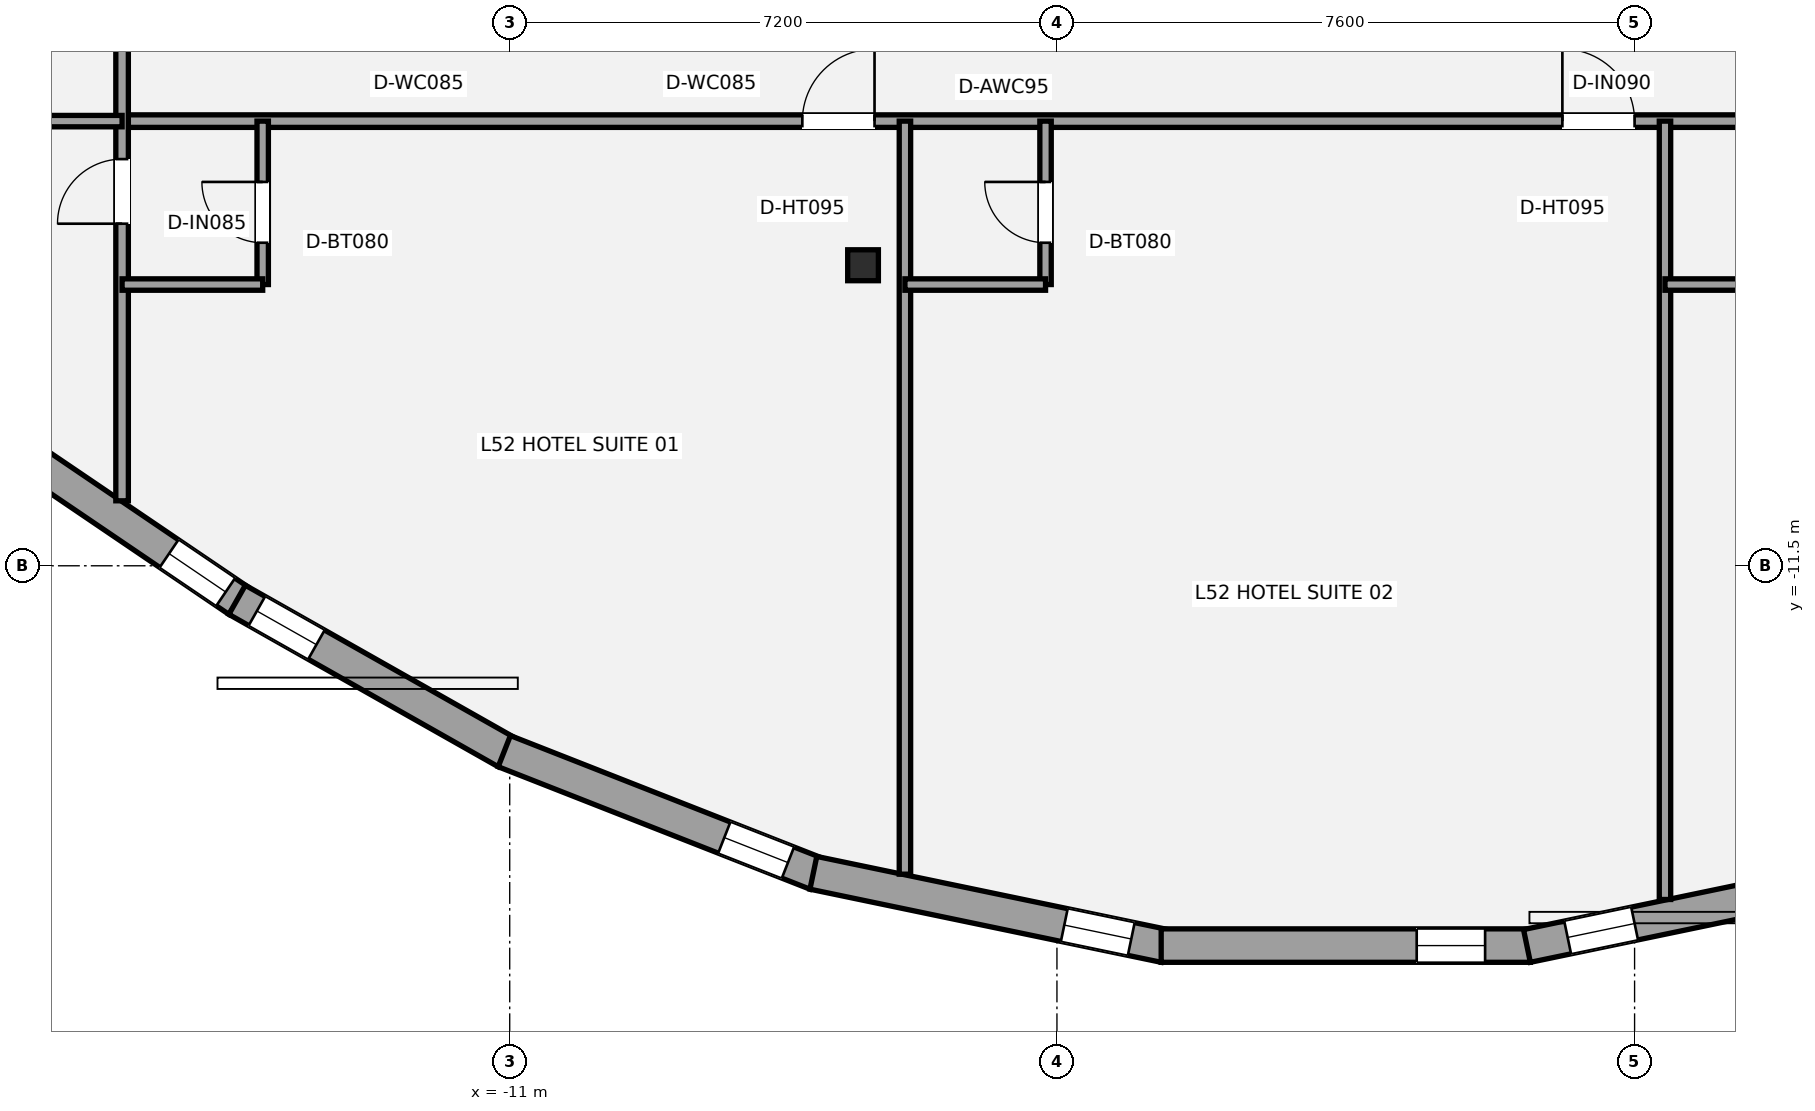
"""IFC4 building model, lengths in metres.
Left out: names, types, materials, properties, quantities, classifications, styles, units other than length and angle.
Written with IfcOpenShell. Run it as: python <this file> out.ifc"""

import sys

from ifc_helpers import new_model, si_unit, direction, frame, frame_2d, origin, origin_2d, place, context, subcontext, project, spatial, rectangle, i_section, extrude, element, fill, save


model = new_model("IFC4")
c1 = context("Model", 3, precision=1e-05, world=origin(), true_north=direction((0.0, 1.0)))
c2 = subcontext(c1, "Body", "Model", "MODEL_VIEW")
j1 = project(units=[si_unit("LENGTHUNIT", "METRE"), si_unit("PLANEANGLEUNIT", "RADIAN")], contexts=[c1])
p1 = place(None, origin())
s1 = spatial("IfcSite", under=j1, at=p1, CompositionType="ELEMENT")
p2 = place(p1, origin())
s2 = spatial("IfcBuilding", under=s1, at=p2, CompositionType="ELEMENT")
p3 = place(p2, frame((0.0, 0.0, 188.6)))
s3 = spatial("IfcBuildingStorey", under=s2, at=p3, CompositionType="ELEMENT", Elevation=188.6)
p4 = place(p3, frame((-6.351, -7.546, 0.0), z_axis=(0.0, 0.0, 1.0), x_axis=(1.0, 0.0, 0.0)))
e1 = element("IfcColumn", 1, at=p4, inside=s3, PredefinedType="COLUMN", context=c2, shape_type="SweptSolid", body=[
    extrude(i_section(OverallWidth=0.404, OverallDepth=0.407, WebThickness=0.027, FlangeThickness=0.044, at=origin_2d()), origin(), (0.0, 0.0, 1.0), 3.2),
])
p5 = place(p3, frame((-14.571, -11.957, 0.0), z_axis=(0.0, 0.0, 1.0), x_axis=(-0.82772633423, 0.56113199483, 0.0)))
e2 = element("IfcWall", 2, at=p5, inside=s3, PredefinedType="STANDARD", context=c2, shape_type="SweptSolid", body=[
    extrude(rectangle(XDim=3.879, YDim=0.44, at=frame_2d((1.939, 0.0))), origin(), (0.0, 0.0, 1.0), 2.315),
])
p6 = place(p5, frame((0.2, 0.0, 0.58)))
e3 = element("IfcOpeningElement", 3, at=p6, cuts=e2, PredefinedType="OPENING", context=c2, shape_type="SweptSolid", body=[
    extrude(rectangle(XDim=0.9, YDim=1.35, at=frame_2d((0.45, 0.675))), frame((0.0, 0.23, 0.0), z_axis=(0.0, -1.0, 0.0), x_axis=(1.0, 0.0, 0.0)), (0.0, 0.0, 1.0), 0.46),
])
p7 = place(p3, frame((-11.043, -13.952, 0.0), z_axis=(0.0, 0.0, 1.0), x_axis=(-0.870346086449, 0.492440544434, 0.0)))
e4 = element("IfcWall", 4, at=p7, inside=s3, PredefinedType="STANDARD", context=c2, shape_type="SweptSolid", body=[
    extrude(rectangle(XDim=4.071, YDim=0.44, at=frame_2d((2.036, 0.0))), origin(), (0.0, 0.0, 1.0), 2.315),
])
p8 = place(p7, frame((2.872, 0.0, 0.58)))
e5 = element("IfcOpeningElement", 5, at=p8, cuts=e4, PredefinedType="OPENING", context=c2, shape_type="SweptSolid", body=[
    extrude(rectangle(XDim=0.9, YDim=1.35, at=frame_2d((0.45, 0.675))), frame((0.0, 0.23, 0.0), z_axis=(0.0, -1.0, 0.0), x_axis=(1.0, 0.0, 0.0)), (0.0, 0.0, 1.0), 0.46),
])
p9 = place(p3, frame((-6.969, -15.55, 0.0), z_axis=(0.0, 0.0, 1.0), x_axis=(-0.930777752543, 0.365585524018, 0.0)))
e6 = element("IfcWall", 6, at=p9, inside=s3, PredefinedType="STANDARD", context=c2, shape_type="SweptSolid", body=[
    extrude(rectangle(XDim=4.407, YDim=0.44, at=frame_2d((2.203, 0.0))), origin(), (0.0, 0.0, 1.0), 2.315),
])
p10 = place(p9, frame((0.397, 0.0, 0.58)))
e7 = element("IfcOpeningElement", 7, at=p10, cuts=e6, PredefinedType="OPENING", context=c2, shape_type="SweptSolid", body=[
    extrude(rectangle(XDim=0.9, YDim=1.35, at=frame_2d((0.45, 0.675))), frame((0.0, 0.23, 0.0), z_axis=(0.0, -1.0, 0.0), x_axis=(1.0, 0.0, 0.0)), (0.0, 0.0, 1.0), 0.46),
])
p11 = place(p3, frame((-2.384, -16.501, 0.0), z_axis=(0.0, 0.0, 1.0), x_axis=(-0.979004509935, 0.203838586943, 0.0)))
e8 = element("IfcWall", 8, at=p11, inside=s3, PredefinedType="STANDARD", context=c2, shape_type="SweptSolid", body=[
    extrude(rectangle(XDim=4.72, YDim=0.44, at=frame_2d((2.36, 0.0))), origin(), (0.0, 0.0, 1.0), 2.315),
])
p12 = place(p11, frame((0.448, 0.0, 0.58)))
e9 = element("IfcOpeningElement", 9, at=p12, cuts=e8, PredefinedType="OPENING", context=c2, shape_type="SweptSolid", body=[
    extrude(rectangle(XDim=0.9, YDim=1.35, at=frame_2d((0.45, 0.675))), frame((0.0, 0.23, 0.0), z_axis=(0.0, -1.0, 0.0), x_axis=(1.0, 0.0, 0.0)), (0.0, 0.0, 1.0), 0.46),
])
p13 = place(p3, frame((2.429, -16.497, 0.0), z_axis=(0.0, 0.0, 1.0), x_axis=(-1.0, 0.0, 0.0)))
e10 = element("IfcWall", 10, at=p13, inside=s3, PredefinedType="STANDARD", context=c2, shape_type="SweptSolid", body=[
    extrude(rectangle(XDim=4.857, YDim=0.44, at=frame_2d((2.429, 0.0))), origin(), (0.0, 0.0, 1.0), 2.315),
])
p14 = place(p13, frame((0.595, 0.0, 0.58)))
e11 = element("IfcOpeningElement", 11, at=p14, cuts=e10, PredefinedType="OPENING", context=c2, shape_type="SweptSolid", body=[
    extrude(rectangle(XDim=0.9, YDim=1.35, at=frame_2d((0.45, 0.675))), frame((0.0, 0.23, 0.0), z_axis=(0.0, -1.0, 0.0), x_axis=(1.0, 0.0, 0.0)), (0.0, 0.0, 1.0), 0.46),
])
p15 = place(p3, frame((7.005, -15.539, 0.0), z_axis=(0.0, 0.0, 1.0), x_axis=(-0.979004509935, -0.203838586943, 0.0)))
e12 = element("IfcWall", 12, at=p15, inside=s3, PredefinedType="STANDARD", context=c2, shape_type="SweptSolid", body=[
    extrude(rectangle(XDim=4.72, YDim=0.44, at=frame_2d((2.36, 0.0))), origin(), (0.0, 0.0, 1.0), 2.315),
])
p16 = place(p15, frame((3.273, 0.0, 0.58)))
e13 = element("IfcOpeningElement", 13, at=p16, cuts=e12, PredefinedType="OPENING", context=c2, shape_type="SweptSolid", body=[
    extrude(rectangle(XDim=0.9, YDim=1.35, at=frame_2d((0.45, 0.675))), frame((0.0, 0.23, 0.0), z_axis=(0.0, -1.0, 0.0), x_axis=(1.0, 0.0, 0.0)), (0.0, 0.0, 1.0), 0.46),
])
p17 = place(p3, frame((-16.1, -5.65, 0.0), z_axis=(0.0, 0.0, 1.0), x_axis=(1.0, 0.0, 0.0)))
e14 = element("IfcWall", 14, at=p17, inside=s3, PredefinedType="PARTITIONING", context=c2, shape_type="SweptSolid", body=[
    extrude(rectangle(XDim=31.65, YDim=0.165, at=frame_2d((15.825, 0.0))), origin(), (0.0, 0.0, 1.0), 2.398),
])
p18 = place(p17, frame((8.95, 0.0, 0.0)))
e15 = element("IfcOpeningElement", 15, at=p18, cuts=e14, PredefinedType="OPENING", context=c2, shape_type="SweptSolid", body=[
    extrude(rectangle(XDim=0.95, YDim=2.15, at=frame_2d((0.475, 1.075))), frame((0.0, 0.093, 0.0), z_axis=(0.0, -1.0, 0.0), x_axis=(1.0, 0.0, 0.0)), (0.0, 0.0, 1.0), 0.185),
])
p19 = place(p17, frame((18.95, 0.0, 0.0)))
e16 = element("IfcOpeningElement", 16, at=p19, cuts=e14, PredefinedType="OPENING", context=c2, shape_type="SweptSolid", body=[
    extrude(rectangle(XDim=0.95, YDim=2.15, at=frame_2d((0.475, 1.075))), frame((0.0, 0.093, 0.0), z_axis=(0.0, -1.0, 0.0), x_axis=(1.0, 0.0, 0.0)), (0.0, 0.0, 1.0), 0.185),
])
p20 = place(p17, frame((30.3, 0.0, 0.0)))
e17 = element("IfcOpeningElement", 17, at=p20, cuts=e14, PredefinedType="OPENING", context=c2, shape_type="SweptSolid", body=[
    extrude(rectangle(XDim=0.95, YDim=2.15, at=frame_2d((0.475, 1.075))), frame((0.0, 0.093, 0.0), z_axis=(0.0, -1.0, 0.0), x_axis=(1.0, 0.0, 0.0)), (0.0, 0.0, 1.0), 0.185),
])
p21 = place(p3, frame((-16.1, -10.645, 0.0), z_axis=(0.0, 0.0, 1.0), x_axis=(0.0, 1.0, 0.0)))
e18 = element("IfcWall", 18, at=p21, inside=s3, PredefinedType="PARTITIONING", context=c2, shape_type="SweptSolid", body=[
    extrude(rectangle(XDim=18.195, YDim=0.165, at=frame_2d((9.098, 0.0))), origin(), (0.0, 0.0, 1.0), 2.473),
])
p22 = place(p21, frame((3.646, 0.0, 0.0)))
e19 = element("IfcOpeningElement", 19, at=p22, cuts=e18, PredefinedType="OPENING", context=c2, shape_type="SweptSolid", body=[
    extrude(rectangle(XDim=0.85, YDim=2.1, at=frame_2d((0.425, 1.05))), frame((0.0, 0.093, 0.0), z_axis=(0.0, -1.0, 0.0), x_axis=(1.0, 0.0, 0.0)), (0.0, 0.0, 1.0), 0.185),
])
p23 = place(p21, frame((6.821, 0.0, 0.0)))
e20 = element("IfcOpeningElement", 20, at=p23, cuts=e18, PredefinedType="OPENING", context=c2, shape_type="SweptSolid", body=[
    extrude(rectangle(XDim=1.0, YDim=2.15, at=frame_2d((0.5, 1.075))), frame((0.0, 0.093, 0.0), z_axis=(0.0, -1.0, 0.0), x_axis=(1.0, 0.0, 0.0)), (0.0, 0.0, 1.0), 0.185),
])
p24 = place(p21, frame((11.246, 0.0, 0.0)))
e21 = element("IfcOpeningElement", 21, at=p24, cuts=e18, PredefinedType="OPENING", context=c2, shape_type="SweptSolid", body=[
    extrude(rectangle(XDim=1.0, YDim=2.15, at=frame_2d((0.5, 1.075))), frame((0.0, 0.093, 0.0), z_axis=(0.0, -1.0, 0.0), x_axis=(1.0, 0.0, 0.0)), (0.0, 0.0, 1.0), 0.185),
])
p25 = place(p21, frame((15.521, 0.0, 0.0)))
e22 = element("IfcOpeningElement", 22, at=p25, cuts=e18, PredefinedType="OPENING", context=c2, shape_type="SweptSolid", body=[
    extrude(rectangle(XDim=1.0, YDim=2.15, at=frame_2d((0.5, 1.075))), frame((0.0, 0.093, 0.0), z_axis=(0.0, -1.0, 0.0), x_axis=(1.0, 0.0, 0.0)), (0.0, 0.0, 1.0), 0.185),
])
p26 = place(p3, frame((-21.906, -5.65, 0.0), z_axis=(0.0, 0.0, 1.0), x_axis=(1.0, 0.0, 0.0)))
e23 = element("IfcWall", 23, at=p26, inside=s3, PredefinedType="PLUMBINGWALL", context=c2, shape_type="SweptSolid", body=[
    extrude(rectangle(XDim=5.806, YDim=0.15, at=frame_2d((2.903, 0.0))), origin(), (0.0, 0.0, 1.0), 2.473),
])
p27 = place(p3, frame((-5.8, -15.557, 0.0), z_axis=(0.0, 0.0, 1.0), x_axis=(0.0, 1.0, 0.0)))
e24 = element("IfcWall", 24, at=p27, inside=s3, PredefinedType="PLUMBINGWALL", context=c2, shape_type="SweptSolid", body=[
    extrude(rectangle(XDim=9.907, YDim=0.15, at=frame_2d((4.954, 0.0))), origin(), (0.0, 0.0, 1.0), 2.473),
])
p28 = place(p3, frame((4.2, -15.89, 0.0), z_axis=(0.0, 0.0, 1.0), x_axis=(0.0, 1.0, 0.0)))
e25 = element("IfcWall", 25, at=p28, inside=s3, PredefinedType="PLUMBINGWALL", context=c2, shape_type="SweptSolid", body=[
    extrude(rectangle(XDim=10.24, YDim=0.15, at=frame_2d((5.12, 0.0))), origin(), (0.0, 0.0, 1.0), 2.473),
])
p29 = place(p3, frame((-14.25, -7.8, 0.0), z_axis=(0.0, 0.0, 1.0), x_axis=(0.0, 1.0, 0.0)))
e26 = element("IfcWall", 26, at=p29, inside=s3, PredefinedType="PLUMBINGWALL", context=c2, shape_type="SweptSolid", body=[
    extrude(rectangle(XDim=2.15, YDim=0.15, at=frame_2d((1.075, 0.0))), origin(), (0.0, 0.0, 1.0), 2.473),
])
p30 = place(p29, frame((0.55, 0.0, 0.0)))
e27 = element("IfcOpeningElement", 27, at=p30, cuts=e26, PredefinedType="OPENING", context=c2, shape_type="SweptSolid", body=[
    extrude(rectangle(XDim=0.8, YDim=2.1, at=frame_2d((0.4, 1.05))), frame((0.0, 0.085, 0.0), z_axis=(0.0, -1.0, 0.0), x_axis=(1.0, 0.0, 0.0)), (0.0, 0.0, 1.0), 0.17),
])
p31 = place(p3, frame((-16.1, -7.8, 0.0), z_axis=(0.0, 0.0, 1.0), x_axis=(1.0, 0.0, 0.0)))
e28 = element("IfcWall", 28, at=p31, inside=s3, PredefinedType="PLUMBINGWALL", context=c2, shape_type="SweptSolid", body=[
    extrude(rectangle(XDim=1.85, YDim=0.15, at=frame_2d((0.925, 0.0))), origin(), (0.0, 0.0, 1.0), 2.473),
])
p32 = place(p3, frame((-3.95, -7.8, 0.0), z_axis=(0.0, 0.0, 1.0), x_axis=(0.0, 1.0, 0.0)))
e29 = element("IfcWall", 29, at=p32, inside=s3, PredefinedType="PLUMBINGWALL", context=c2, shape_type="SweptSolid", body=[
    extrude(rectangle(XDim=2.15, YDim=0.15, at=frame_2d((1.075, 0.0))), origin(), (0.0, 0.0, 1.0), 2.473),
])
p33 = place(p32, frame((0.55, 0.0, 0.0)))
e30 = element("IfcOpeningElement", 30, at=p33, cuts=e29, PredefinedType="OPENING", context=c2, shape_type="SweptSolid", body=[
    extrude(rectangle(XDim=0.8, YDim=2.1, at=frame_2d((0.4, 1.05))), frame((0.0, 0.085, 0.0), z_axis=(0.0, -1.0, 0.0), x_axis=(1.0, 0.0, 0.0)), (0.0, 0.0, 1.0), 0.17),
])
for number, where, z_axis, x_axis in (
    (31, (-5.8, -7.8, 0.0), (0.0, 0.0, 1.0), (1.0, 0.0, 0.0)),
    (32, (4.2, -7.8, 0.0), (0.0, 0.0, 1.0), (1.0, 0.0, 0.0)),
):
    element("IfcWall", number, at=place(p3, frame(where, z_axis=z_axis, x_axis=x_axis)), inside=s3, PredefinedType="PLUMBINGWALL", context=c2, shape_type="SweptSolid", body=[
        extrude(rectangle(XDim=1.85, YDim=0.15, at=frame_2d((0.925, 0.0))), origin(), (0.0, 0.0, 1.0), 3.02),
    ])
p34 = place(p6, origin())
e33 = element("IfcWindow", 33, at=p34, inside=s3, PartitioningType="SINGLE_PANEL", PredefinedType="WINDOW", context=c2, shape_type="SweptSolid", body=[
    extrude(rectangle(XDim=0.9, YDim=1.35, at=frame_2d((0.45, 0.675))), frame((0.0, -0.01, 0.0), z_axis=(0.0, -1.0, 0.0), x_axis=(1.0, 0.0, 0.0)), (0.0, 0.0, 1.0), 0.06),
])
fill(e3, e33)
p35 = place(p8, origin())
e34 = element("IfcWindow", 34, at=p35, inside=s3, PartitioningType="SINGLE_PANEL", PredefinedType="WINDOW", context=c2, shape_type="SweptSolid", body=[
    extrude(rectangle(XDim=0.9, YDim=1.35, at=frame_2d((0.45, 0.675))), frame((0.0, -0.01, 0.0), z_axis=(0.0, -1.0, 0.0), x_axis=(1.0, 0.0, 0.0)), (0.0, 0.0, 1.0), 0.06),
])
fill(e5, e34)
p36 = place(p10, origin())
e35 = element("IfcWindow", 35, at=p36, inside=s3, PartitioningType="SINGLE_PANEL", PredefinedType="WINDOW", context=c2, shape_type="SweptSolid", body=[
    extrude(rectangle(XDim=0.9, YDim=1.35, at=frame_2d((0.45, 0.675))), frame((0.0, -0.01, 0.0), z_axis=(0.0, -1.0, 0.0), x_axis=(1.0, 0.0, 0.0)), (0.0, 0.0, 1.0), 0.06),
])
fill(e7, e35)
p37 = place(p12, origin())
e36 = element("IfcWindow", 36, at=p37, inside=s3, PartitioningType="SINGLE_PANEL", PredefinedType="WINDOW", context=c2, shape_type="SweptSolid", body=[
    extrude(rectangle(XDim=0.9, YDim=1.35, at=frame_2d((0.45, 0.675))), frame((0.0, -0.01, 0.0), z_axis=(0.0, -1.0, 0.0), x_axis=(1.0, 0.0, 0.0)), (0.0, 0.0, 1.0), 0.06),
])
fill(e9, e36)
p38 = place(p14, origin())
e37 = element("IfcWindow", 37, at=p38, inside=s3, PartitioningType="SINGLE_PANEL", PredefinedType="WINDOW", context=c2, shape_type="SweptSolid", body=[
    extrude(rectangle(XDim=0.9, YDim=1.35, at=frame_2d((0.45, 0.675))), frame((0.0, -0.01, 0.0), z_axis=(0.0, -1.0, 0.0), x_axis=(1.0, 0.0, 0.0)), (0.0, 0.0, 1.0), 0.06),
])
fill(e11, e37)
p39 = place(p16, origin())
e38 = element("IfcWindow", 38, at=p39, inside=s3, PartitioningType="SINGLE_PANEL", PredefinedType="WINDOW", context=c2, shape_type="SweptSolid", body=[
    extrude(rectangle(XDim=0.9, YDim=1.35, at=frame_2d((0.45, 0.675))), frame((0.0, -0.01, 0.0), z_axis=(0.0, -1.0, 0.0), x_axis=(1.0, 0.0, 0.0)), (0.0, 0.0, 1.0), 0.06),
])
fill(e13, e38)
p40 = place(p22, origin())
e39 = element("IfcDoor", 39, at=p40, inside=s3, OperationType="SINGLE_SWING_LEFT", PredefinedType="DOOR", context=c2, shape_type="SweptSolid", body=[
    extrude(rectangle(XDim=0.85, YDim=2.1, at=frame_2d((0.425, 1.05))), frame((0.0, 0.025, 0.0), z_axis=(0.0, -1.0, 0.0), x_axis=(1.0, 0.0, 0.0)), (0.0, 0.0, 1.0), 0.05),
])
fill(e19, e39)
p41 = place(p18, origin())
e40 = element("IfcDoor", 40, at=p41, inside=s3, OperationType="SINGLE_SWING_RIGHT", PredefinedType="DOOR", context=c2, shape_type="SweptSolid", body=[
    extrude(rectangle(XDim=0.95, YDim=2.15, at=frame_2d((0.475, 1.075))), frame((0.0, 0.025, 0.0), z_axis=(0.0, -1.0, 0.0), x_axis=(1.0, 0.0, 0.0)), (0.0, 0.0, 1.0), 0.05),
])
fill(e15, e40)
p42 = place(p30, origin())
e41 = element("IfcDoor", 41, at=p42, inside=s3, OperationType="SINGLE_SWING_RIGHT", PredefinedType="DOOR", context=c2, shape_type="SweptSolid", body=[
    extrude(rectangle(XDim=0.8, YDim=2.1, at=frame_2d((0.4, 1.05))), frame((0.0, 0.025, 0.0), z_axis=(0.0, -1.0, 0.0), x_axis=(1.0, 0.0, 0.0)), (0.0, 0.0, 1.0), 0.05),
])
fill(e27, e41)
p43 = place(p19, origin())
e42 = element("IfcDoor", 42, at=p43, inside=s3, OperationType="SINGLE_SWING_LEFT", PredefinedType="DOOR", context=c2, shape_type="SweptSolid", body=[
    extrude(rectangle(XDim=0.95, YDim=2.15, at=frame_2d((0.475, 1.075))), frame((0.0, 0.025, 0.0), z_axis=(0.0, -1.0, 0.0), x_axis=(1.0, 0.0, 0.0)), (0.0, 0.0, 1.0), 0.05),
])
fill(e16, e42)
p44 = place(p33, origin())
e43 = element("IfcDoor", 43, at=p44, inside=s3, OperationType="SINGLE_SWING_RIGHT", PredefinedType="DOOR", context=c2, shape_type="SweptSolid", body=[
    extrude(rectangle(XDim=0.8, YDim=2.1, at=frame_2d((0.4, 1.05))), frame((0.0, 0.025, 0.0), z_axis=(0.0, -1.0, 0.0), x_axis=(1.0, 0.0, 0.0)), (0.0, 0.0, 1.0), 0.05),
])
fill(e30, e43)
save(model, sys.argv[1])
